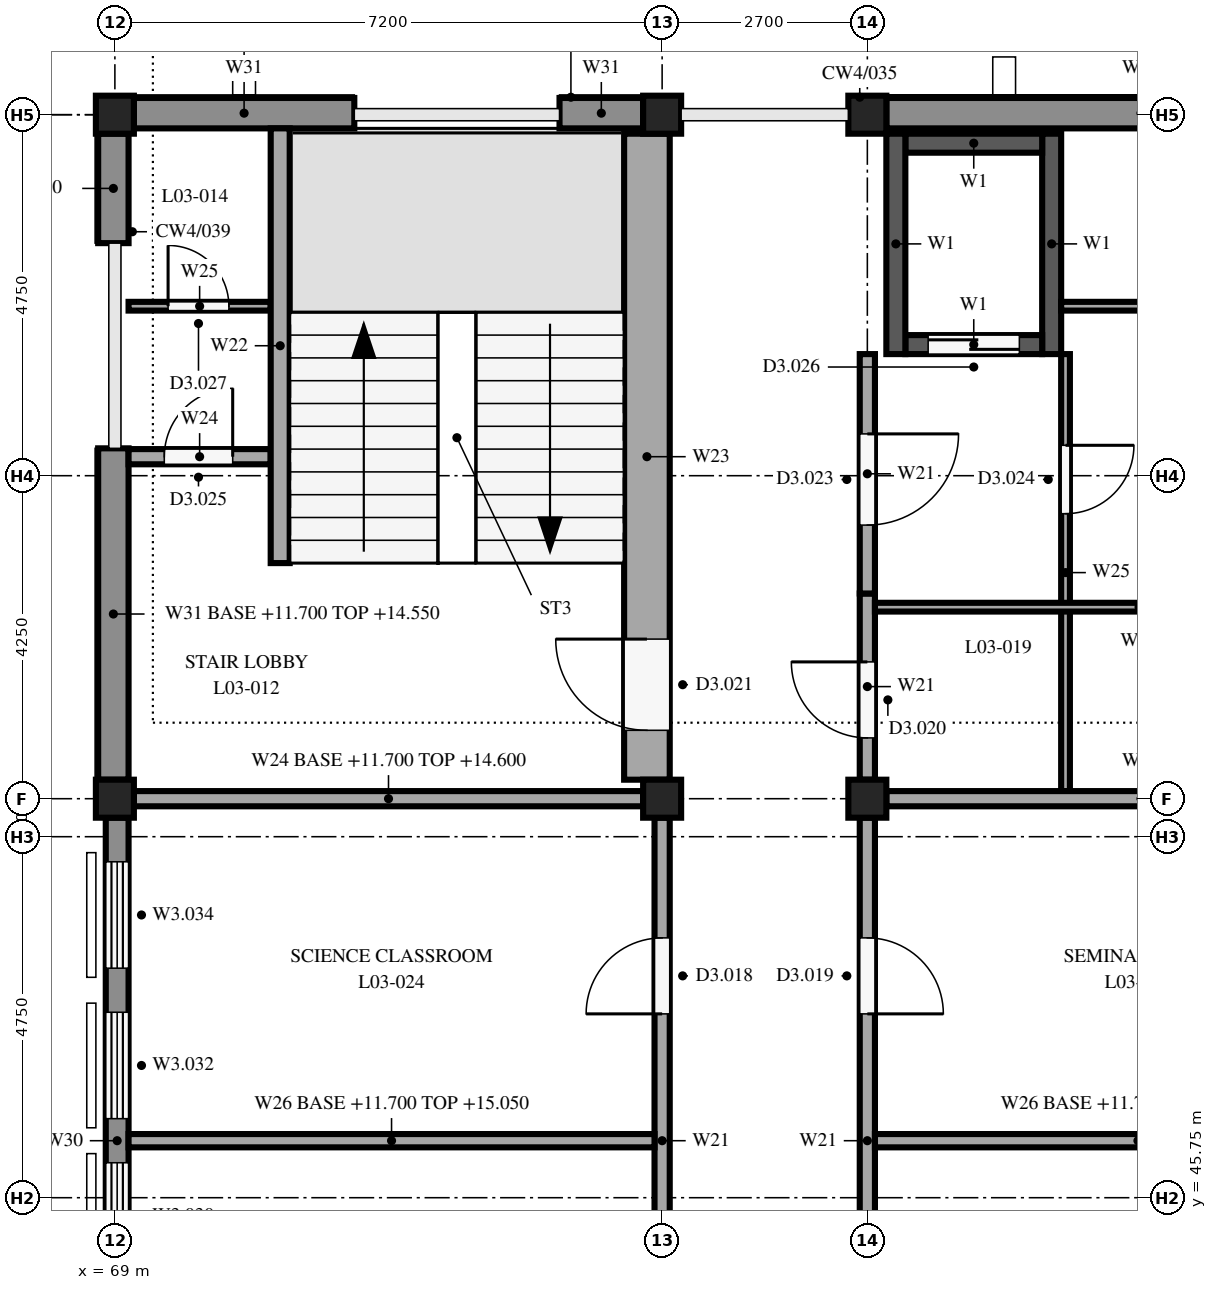
"""IFC4 building model, lengths in metres.
Left out: names, types, materials, properties, quantities, classifications, styles, units other than length and angle.
Written with IfcOpenShell. Run it as: python <this file> out.ifc"""

import sys

from ifc_helpers import new_model, si_unit, direction, frame, frame_2d, origin, origin_2d, place, context, subcontext, project, spatial, rectangle, extrude, element, fill, save


model = new_model("IFC4")
c1 = context("Model", 3, precision=1e-05, world=origin(), true_north=direction((0.0, 1.0)))
c2 = subcontext(c1, "Body", "Model", "MODEL_VIEW")
j1 = project(units=[si_unit("LENGTHUNIT", "METRE"), si_unit("PLANEANGLEUNIT", "RADIAN")], contexts=[c1])
p1 = place(None, origin())
s1 = spatial("IfcSite", under=j1, at=p1, CompositionType="ELEMENT")
p2 = place(p1, origin())
s2 = spatial("IfcBuilding", under=s1, at=p2, CompositionType="ELEMENT")
p3 = place(p2, frame((0.0, 0.0, 11.7)))
s3 = spatial("IfcBuildingStorey", under=s2, at=p3, CompositionType="ELEMENT", Elevation=11.7)
for number, where, z_axis, x_axis in (
    (1, (69.0, 51.0, 0.0), (0.0, 0.0, 1.0), (1.0, 0.0, 0.0)),
    (2, (69.0, 60.0, 0.0), (0.0, 0.0, 1.0), (1.0, 0.0, 0.0)),
    (3, (76.2, 51.0, 0.0), (0.0, 0.0, 1.0), (1.0, 0.0, 0.0)),
    (4, (76.2, 60.0, 0.0), (0.0, 0.0, 1.0), (1.0, 0.0, 0.0)),
    (5, (78.9, 51.0, 0.0), (0.0, 0.0, 1.0), (1.0, 0.0, 0.0)),
    (6, (78.9, 60.0, 0.0), (0.0, 0.0, 1.0), (1.0, 0.0, 0.0)),
):
    element("IfcColumn", number, at=place(p3, frame(where, z_axis=z_axis, x_axis=x_axis)), inside=s3, PredefinedType="COLUMN", context=c2, shape_type="SweptSolid", body=[
        extrude(rectangle(XDim=0.5, YDim=0.5, at=origin_2d()), origin(), (0.0, 0.0, 1.0), 3.35),
    ])
for number, where, z_axis, x_axis in (
    (7, (79.275, 56.85, 0.0), (0.0, 0.0, 1.0), (0.0, 1.0, 0.0)),
    (8, (81.325, 56.85, 0.0), (0.0, 0.0, 1.0), (0.0, 1.0, 0.0)),
):
    element("IfcWall", number, at=place(p3, frame(where, z_axis=z_axis, x_axis=x_axis)), inside=s3, PredefinedType="SHEAR", context=c2, shape_type="SweptSolid", body=[
        extrude(rectangle(XDim=2.9, YDim=0.25, at=frame_2d((1.45, 0.0))), origin(), (0.0, 0.0, 1.0), 3.35),
    ])
p4 = place(p3, frame((79.4, 56.975, 0.0), z_axis=(0.0, 0.0, 1.0), x_axis=(1.0, 0.0, 0.0)))
e9 = element("IfcWall", 9, at=p4, inside=s3, PredefinedType="SHEAR", context=c2, shape_type="SweptSolid", body=[
    extrude(rectangle(XDim=1.8, YDim=0.25, at=frame_2d((0.9, 0.0))), origin(), (0.0, 0.0, 1.0), 3.35),
])
p5 = place(p4, frame((0.3, 0.0, 0.0)))
e10 = element("IfcOpeningElement", 10, at=p5, cuts=e9, PredefinedType="OPENING", context=c2, shape_type="SweptSolid", body=[
    extrude(rectangle(XDim=1.2, YDim=2.1, at=frame_2d((0.6, 1.05))), frame((0.0, 0.135, 0.0), z_axis=(0.0, -1.0, 0.0), x_axis=(1.0, 0.0, 0.0)), (0.0, 0.0, 1.0), 0.27),
])
p6 = place(p3, frame((79.4, 59.625, 0.0), z_axis=(0.0, 0.0, 1.0), x_axis=(1.0, 0.0, 0.0)))
e11 = element("IfcWall", 11, at=p6, inside=s3, PredefinedType="SHEAR", context=c2, shape_type="SweptSolid", body=[
    extrude(rectangle(XDim=1.8, YDim=0.25, at=frame_2d((0.9, 0.0))), origin(), (0.0, 0.0, 1.0), 3.35),
])
p7 = place(p3, frame((69.03, 42.25, 0.0), z_axis=(0.0, 0.0, 1.0), x_axis=(0.0, 1.0, 0.0)))
e12 = element("IfcWall", 12, at=p7, inside=s3, PredefinedType="STANDARD", context=c2, shape_type="SweptSolid", body=[
    extrude(rectangle(XDim=8.5, YDim=0.3, at=frame_2d((4.25, 0.0))), origin(), (0.0, 0.0, 1.0), 2.85),
])
p8 = place(p7, frame((0.58, 0.0, 0.6)))
e13 = element("IfcOpeningElement", 13, at=p8, cuts=e12, PredefinedType="OPENING", context=c2, shape_type="SweptSolid", body=[
    extrude(rectangle(XDim=1.4, YDim=2.2, at=frame_2d((0.7, 1.1))), frame((0.0, 0.16, 0.0), z_axis=(0.0, -1.0, 0.0), x_axis=(1.0, 0.0, 0.0)), (0.0, 0.0, 1.0), 0.32),
])
p9 = place(p7, frame((2.56, 0.0, 0.6)))
e14 = element("IfcOpeningElement", 14, at=p9, cuts=e12, PredefinedType="OPENING", context=c2, shape_type="SweptSolid", body=[
    extrude(rectangle(XDim=1.4, YDim=2.2, at=frame_2d((0.7, 1.1))), frame((0.0, 0.16, 0.0), z_axis=(0.0, -1.0, 0.0), x_axis=(1.0, 0.0, 0.0)), (0.0, 0.0, 1.0), 0.32),
])
p10 = place(p7, frame((4.54, 0.0, 0.6)))
e15 = element("IfcOpeningElement", 15, at=p10, cuts=e12, PredefinedType="OPENING", context=c2, shape_type="SweptSolid", body=[
    extrude(rectangle(XDim=1.4, YDim=2.2, at=frame_2d((0.7, 1.1))), frame((0.0, 0.16, 0.0), z_axis=(0.0, -1.0, 0.0), x_axis=(1.0, 0.0, 0.0)), (0.0, 0.0, 1.0), 0.32),
])
p11 = place(p7, frame((6.52, 0.0, 0.6)))
e16 = element("IfcOpeningElement", 16, at=p11, cuts=e12, PredefinedType="OPENING", context=c2, shape_type="SweptSolid", body=[
    extrude(rectangle(XDim=1.4, YDim=2.2, at=frame_2d((0.7, 1.1))), frame((0.0, 0.16, 0.0), z_axis=(0.0, -1.0, 0.0), x_axis=(1.0, 0.0, 0.0)), (0.0, 0.0, 1.0), 0.32),
])
p12 = place(p3, frame((68.98, 51.25, 0.0), z_axis=(0.0, 0.0, 1.0), x_axis=(0.0, 1.0, 0.0)))
e17 = element("IfcWall", 17, at=p12, inside=s3, PredefinedType="STANDARD", context=c2, shape_type="SweptSolid", body=[
    extrude(rectangle(XDim=4.36, YDim=0.4, at=frame_2d((2.18, 0.0))), origin(), (0.0, 0.0, 1.0), 2.85),
])
p13 = place(p3, frame((68.98, 58.31, 0.0), z_axis=(0.0, 0.0, 1.0), x_axis=(0.0, 1.0, 0.0)))
e18 = element("IfcWall", 18, at=p13, inside=s3, PredefinedType="STANDARD", context=c2, shape_type="SweptSolid", body=[
    extrude(rectangle(XDim=1.44, YDim=0.4, at=frame_2d((0.72, 0.0))), origin(), (0.0, 0.0, 1.0), 2.85),
])
p14 = place(p3, frame((69.25, 60.02, 0.0), z_axis=(0.0, 0.0, 1.0), x_axis=(1.0, 0.0, 0.0)))
e19 = element("IfcWall", 19, at=p14, inside=s3, PredefinedType="STANDARD", context=c2, shape_type="SweptSolid", body=[
    extrude(rectangle(XDim=2.9, YDim=0.4, at=frame_2d((1.45, 0.0))), origin(), (0.0, 0.0, 1.0), 2.9),
])
p15 = place(p3, frame((74.85, 60.02, 0.0), z_axis=(0.0, 0.0, 1.0), x_axis=(1.0, 0.0, 0.0)))
e20 = element("IfcWall", 20, at=p15, inside=s3, PredefinedType="STANDARD", context=c2, shape_type="SweptSolid", body=[
    extrude(rectangle(XDim=1.1, YDim=0.4, at=frame_2d((0.55, 0.0))), origin(), (0.0, 0.0, 1.0), 2.9),
])
p16 = place(p3, frame((79.15, 60.02, 0.0), z_axis=(0.0, 0.0, 1.0), x_axis=(1.0, 0.0, 0.0)))
e21 = element("IfcWall", 21, at=p16, inside=s3, PredefinedType="STANDARD", context=c2, shape_type="SweptSolid", body=[
    extrude(rectangle(XDim=6.7, YDim=0.4, at=frame_2d((3.35, 0.0))), origin(), (0.0, 0.0, 1.0), 2.9),
])
p17 = place(p16, frame((3.4, 0.0, 1.6)))
e22 = element("IfcOpeningElement", 22, at=p17, cuts=e21, PredefinedType="OPENING", context=c2, shape_type="SweptSolid", body=[
    extrude(rectangle(XDim=0.9, YDim=1.0, at=frame_2d((0.45, 0.5))), frame((0.0, 0.21, 0.0), z_axis=(0.0, -1.0, 0.0), x_axis=(1.0, 0.0, 0.0)), (0.0, 0.0, 1.0), 0.42),
])
p18 = place(p3, frame((71.175, 54.1, 0.0), z_axis=(0.0, 0.0, 1.0), x_axis=(0.0, 1.0, 0.0)))
e23 = element("IfcWall", 23, at=p18, inside=s3, PredefinedType="SOLIDWALL", context=c2, shape_type="SweptSolid", body=[
    extrude(rectangle(XDim=5.72, YDim=0.25, at=frame_2d((2.86, 0.0))), origin(), (0.0, 0.0, 1.0), 3.35),
])
p19 = place(p3, frame((76.0, 51.25, 0.0), z_axis=(0.0, 0.0, 1.0), x_axis=(0.0, 1.0, 0.0)))
e24 = element("IfcWall", 24, at=p19, inside=s3, PredefinedType="SOLIDWALL", context=c2, shape_type="SweptSolid", body=[
    extrude(rectangle(XDim=8.5, YDim=0.6, at=frame_2d((4.25, 0.0))), origin(), (0.0, 0.0, 1.0), 3.35),
])
p20 = place(p19, frame((0.65, 0.0, 0.0)))
e25 = element("IfcOpeningElement", 25, at=p20, cuts=e24, PredefinedType="OPENING", context=c2, shape_type="SweptSolid", body=[
    extrude(rectangle(XDim=1.2, YDim=2.1, at=frame_2d((0.6, 1.05))), frame((0.0, 0.31, 0.0), z_axis=(0.0, -1.0, 0.0), x_axis=(1.0, 0.0, 0.0)), (0.0, 0.0, 1.0), 0.62),
])
p21 = place(p3, frame((69.18, 55.5, 0.0), z_axis=(0.0, 0.0, 1.0), x_axis=(1.0, 0.0, 0.0)))
e26 = element("IfcWall", 26, at=p21, inside=s3, PredefinedType="SOLIDWALL", context=c2, shape_type="SweptSolid", body=[
    extrude(rectangle(XDim=1.87, YDim=0.2, at=frame_2d((0.935, 0.0))), origin(), (0.0, 0.0, 1.0), 3.35),
])
p22 = place(p21, frame((0.47, 0.0, 0.0)))
e27 = element("IfcOpeningElement", 27, at=p22, cuts=e26, PredefinedType="OPENING", context=c2, shape_type="SweptSolid", body=[
    extrude(rectangle(XDim=0.9, YDim=2.1, at=frame_2d((0.45, 1.05))), frame((0.0, 0.11, 0.0), z_axis=(0.0, -1.0, 0.0), x_axis=(1.0, 0.0, 0.0)), (0.0, 0.0, 1.0), 0.22),
])
p23 = place(p3, frame((69.18, 57.48, 0.0), z_axis=(0.0, 0.0, 1.0), x_axis=(1.0, 0.0, 0.0)))
e28 = element("IfcWall", 28, at=p23, inside=s3, PredefinedType="PARTITIONING", context=c2, shape_type="SweptSolid", body=[
    extrude(rectangle(XDim=1.87, YDim=0.115, at=frame_2d((0.935, 0.0))), origin(), (0.0, 0.0, 1.0), 3.35),
])
p24 = place(p23, frame((0.52, 0.0, 0.0)))
e29 = element("IfcOpeningElement", 29, at=p24, cuts=e28, PredefinedType="OPENING", context=c2, shape_type="SweptSolid", body=[
    extrude(rectangle(XDim=0.8, YDim=2.1, at=frame_2d((0.4, 1.05))), frame((0.0, 0.067, 0.0), z_axis=(0.0, -1.0, 0.0), x_axis=(1.0, 0.0, 0.0)), (0.0, 0.0, 1.0), 0.135),
])
p25 = place(p3, frame((69.25, 51.0, 0.0), z_axis=(0.0, 0.0, 1.0), x_axis=(1.0, 0.0, 0.0)))
e30 = element("IfcWall", 30, at=p25, inside=s3, PredefinedType="SOLIDWALL", context=c2, shape_type="SweptSolid", body=[
    extrude(rectangle(XDim=6.7, YDim=0.2, at=frame_2d((3.35, 0.0))), origin(), (0.0, 0.0, 1.0), 2.9),
])
p26 = place(p3, frame((78.9, 51.25, 0.0), z_axis=(0.0, 0.0, 1.0), x_axis=(0.0, 1.0, 0.0)))
e31 = element("IfcWall", 31, at=p26, inside=s3, PredefinedType="PARTITIONING", context=c2, shape_type="SweptSolid", body=[
    extrude(rectangle(XDim=2.45, YDim=0.2, at=frame_2d((1.225, 0.0))), origin(), (0.0, 0.0, 1.0), 2.9),
])
p27 = place(p26, frame((0.55, 0.0, 0.0)))
e32 = element("IfcOpeningElement", 32, at=p27, cuts=e31, PredefinedType="OPENING", context=c2, shape_type="SweptSolid", body=[
    extrude(rectangle(XDim=1.0, YDim=2.1, at=frame_2d((0.5, 1.05))), frame((0.0, 0.11, 0.0), z_axis=(0.0, -1.0, 0.0), x_axis=(1.0, 0.0, 0.0)), (0.0, 0.0, 1.0), 0.22),
])
p28 = place(p3, frame((78.9, 56.85, 0.0), z_axis=(0.0, 0.0, 1.0), x_axis=(0.0, -1.0, 0.0)))
e33 = element("IfcWall", 33, at=p28, inside=s3, PredefinedType="PARTITIONING", context=c2, shape_type="SweptSolid", body=[
    extrude(rectangle(XDim=3.15, YDim=0.2, at=frame_2d((1.575, 0.0))), origin(), (0.0, 0.0, 1.0), 2.9),
])
p29 = place(p28, frame((1.05, 0.0, 0.0)))
e34 = element("IfcOpeningElement", 34, at=p29, cuts=e33, PredefinedType="OPENING", context=c2, shape_type="SweptSolid", body=[
    extrude(rectangle(XDim=1.2, YDim=2.1, at=frame_2d((0.6, 1.05))), frame((0.0, 0.11, 0.0), z_axis=(0.0, -1.0, 0.0), x_axis=(1.0, 0.0, 0.0)), (0.0, 0.0, 1.0), 0.22),
])
p30 = place(p3, frame((79.15, 51.0, 0.0), z_axis=(0.0, 0.0, 1.0), x_axis=(1.0, 0.0, 0.0)))
e35 = element("IfcWall", 35, at=p30, inside=s3, PredefinedType="PARTITIONING", context=c2, shape_type="SweptSolid", body=[
    extrude(rectangle(XDim=6.7, YDim=0.2, at=frame_2d((3.35, 0.0))), origin(), (0.0, 0.0, 1.0), 2.9),
])
p31 = place(p3, frame((81.508, 56.85, 0.0), z_axis=(0.0, 0.0, 1.0), x_axis=(0.0, -1.0, 0.0)))
e36 = element("IfcWall", 36, at=p31, inside=s3, PredefinedType="PARTITIONING", context=c2, shape_type="SweptSolid", body=[
    extrude(rectangle(XDim=5.75, YDim=0.115, at=frame_2d((2.875, 0.0))), origin(), (0.0, 0.0, 1.0), 3.35),
])
p32 = place(p31, frame((1.2, 0.0, 0.0)))
e37 = element("IfcOpeningElement", 37, at=p32, cuts=e36, PredefinedType="OPENING", context=c2, shape_type="SweptSolid", body=[
    extrude(rectangle(XDim=0.9, YDim=2.1, at=frame_2d((0.45, 1.05))), frame((0.0, 0.067, 0.0), z_axis=(0.0, -1.0, 0.0), x_axis=(1.0, 0.0, 0.0)), (0.0, 0.0, 1.0), 0.135),
])
p33 = place(p3, frame((81.45, 57.48, 0.0), z_axis=(0.0, 0.0, 1.0), x_axis=(1.0, 0.0, 0.0)))
e38 = element("IfcWall", 38, at=p33, inside=s3, PredefinedType="PARTITIONING", context=c2, shape_type="SweptSolid", body=[
    extrude(rectangle(XDim=4.5, YDim=0.115, at=frame_2d((2.25, 0.0))), origin(), (0.0, 0.0, 1.0), 3.35),
])
p34 = place(p33, frame((1.8, 0.0, 0.0)))
e39 = element("IfcOpeningElement", 39, at=p34, cuts=e38, PredefinedType="OPENING", context=c2, shape_type="SweptSolid", body=[
    extrude(rectangle(XDim=0.9, YDim=2.1, at=frame_2d((0.45, 1.05))), frame((0.0, 0.067, 0.0), z_axis=(0.0, -1.0, 0.0), x_axis=(1.0, 0.0, 0.0)), (0.0, 0.0, 1.0), 0.135),
])
p35 = place(p3, frame((85.95, 53.52, 0.0), z_axis=(0.0, 0.0, 1.0), x_axis=(-1.0, 0.0, 0.0)))
e40 = element("IfcWall", 40, at=p35, inside=s3, PredefinedType="PARTITIONING", context=c2, shape_type="SweptSolid", body=[
    extrude(rectangle(XDim=6.95, YDim=0.115, at=frame_2d((3.475, 0.0))), origin(), (0.0, 0.0, 1.0), 3.35),
])
p36 = place(p35, frame((1.7, 0.0, 0.0)))
e41 = element("IfcOpeningElement", 41, at=p36, cuts=e40, PredefinedType="OPENING", context=c2, shape_type="SweptSolid", body=[
    extrude(rectangle(XDim=0.9, YDim=2.1, at=frame_2d((0.45, 1.05))), frame((0.0, 0.067, 0.0), z_axis=(0.0, -1.0, 0.0), x_axis=(1.0, 0.0, 0.0)), (0.0, 0.0, 1.0), 0.135),
])
p37 = place(p3, frame((76.2, 42.25, 0.0), z_axis=(0.0, 0.0, 1.0), x_axis=(0.0, 1.0, 0.0)))
e42 = element("IfcWall", 42, at=p37, inside=s3, PredefinedType="PARTITIONING", context=c2, shape_type="SweptSolid", body=[
    extrude(rectangle(XDim=8.5, YDim=0.2, at=frame_2d((4.25, 0.0))), origin(), (0.0, 0.0, 1.0), 2.9),
])
p38 = place(p37, frame((1.581, 0.0, 0.0)))
e43 = element("IfcOpeningElement", 43, at=p38, cuts=e42, PredefinedType="OPENING", context=c2, shape_type="SweptSolid", body=[
    extrude(rectangle(XDim=1.0, YDim=2.1, at=frame_2d((0.5, 1.05))), frame((0.0, 0.11, 0.0), z_axis=(0.0, -1.0, 0.0), x_axis=(1.0, 0.0, 0.0)), (0.0, 0.0, 1.0), 0.22),
])
p39 = place(p37, frame((5.919, 0.0, 0.0)))
e44 = element("IfcOpeningElement", 44, at=p39, cuts=e42, PredefinedType="OPENING", context=c2, shape_type="SweptSolid", body=[
    extrude(rectangle(XDim=1.0, YDim=2.1, at=frame_2d((0.5, 1.05))), frame((0.0, 0.11, 0.0), z_axis=(0.0, -1.0, 0.0), x_axis=(1.0, 0.0, 0.0)), (0.0, 0.0, 1.0), 0.22),
])
p40 = place(p3, frame((69.18, 46.5, 0.0), z_axis=(0.0, 0.0, 1.0), x_axis=(1.0, 0.0, 0.0)))
e45 = element("IfcWall", 45, at=p40, inside=s3, PredefinedType="PARTITIONING", context=c2, shape_type="SweptSolid", body=[
    extrude(rectangle(XDim=6.92, YDim=0.175, at=frame_2d((3.46, 0.0))), origin(), (0.0, 0.0, 1.0), 3.35),
])
p41 = place(p3, frame((78.9, 50.75, 0.0), z_axis=(0.0, 0.0, 1.0), x_axis=(0.0, -1.0, 0.0)))
e46 = element("IfcWall", 46, at=p41, inside=s3, PredefinedType="PARTITIONING", context=c2, shape_type="SweptSolid", body=[
    extrude(rectangle(XDim=8.5, YDim=0.2, at=frame_2d((4.25, 0.0))), origin(), (0.0, 0.0, 1.0), 2.9),
])
p42 = place(p41, frame((5.919, 0.0, 0.0)))
e47 = element("IfcOpeningElement", 47, at=p42, cuts=e46, PredefinedType="OPENING", context=c2, shape_type="SweptSolid", body=[
    extrude(rectangle(XDim=1.0, YDim=2.1, at=frame_2d((0.5, 1.05))), frame((0.0, 0.11, 0.0), z_axis=(0.0, -1.0, 0.0), x_axis=(1.0, 0.0, 0.0)), (0.0, 0.0, 1.0), 0.22),
])
p43 = place(p41, frame((1.581, 0.0, 0.0)))
e48 = element("IfcOpeningElement", 48, at=p43, cuts=e46, PredefinedType="OPENING", context=c2, shape_type="SweptSolid", body=[
    extrude(rectangle(XDim=1.0, YDim=2.1, at=frame_2d((0.5, 1.05))), frame((0.0, 0.11, 0.0), z_axis=(0.0, -1.0, 0.0), x_axis=(1.0, 0.0, 0.0)), (0.0, 0.0, 1.0), 0.22),
])
p44 = place(p3, frame((79.0, 46.5, 0.0), z_axis=(0.0, 0.0, 1.0), x_axis=(1.0, 0.0, 0.0)))
e49 = element("IfcWall", 49, at=p44, inside=s3, PredefinedType="PARTITIONING", context=c2, shape_type="SweptSolid", body=[
    extrude(rectangle(XDim=6.92, YDim=0.175, at=frame_2d((3.46, 0.0))), origin(), (0.0, 0.0, 1.0), 3.35),
])
p45 = place(p9, origin())
e50 = element("IfcWindow", 50, at=p45, inside=s3, PartitioningType="DOUBLE_PANEL_VERTICAL", PredefinedType="WINDOW", context=c2, shape_type="SweptSolid", body=[
    extrude(rectangle(XDim=1.4, YDim=2.2, at=frame_2d((0.7, 1.1))), frame((0.0, 0.03, 0.0), z_axis=(0.0, -1.0, 0.0), x_axis=(1.0, 0.0, 0.0)), (0.0, 0.0, 1.0), 0.06),
])
fill(e14, e50)
p46 = place(p10, origin())
e51 = element("IfcWindow", 51, at=p46, inside=s3, PartitioningType="DOUBLE_PANEL_VERTICAL", PredefinedType="WINDOW", context=c2, shape_type="SweptSolid", body=[
    extrude(rectangle(XDim=1.4, YDim=2.2, at=frame_2d((0.7, 1.1))), frame((0.0, 0.03, 0.0), z_axis=(0.0, -1.0, 0.0), x_axis=(1.0, 0.0, 0.0)), (0.0, 0.0, 1.0), 0.06),
])
fill(e15, e51)
p47 = place(p11, origin())
e52 = element("IfcWindow", 52, at=p47, inside=s3, PartitioningType="DOUBLE_PANEL_VERTICAL", PredefinedType="WINDOW", context=c2, shape_type="SweptSolid", body=[
    extrude(rectangle(XDim=1.4, YDim=2.2, at=frame_2d((0.7, 1.1))), frame((0.0, 0.03, 0.0), z_axis=(0.0, -1.0, 0.0), x_axis=(1.0, 0.0, 0.0)), (0.0, 0.0, 1.0), 0.06),
])
fill(e16, e52)
p48 = place(p20, origin())
e53 = element("IfcDoor", 53, at=p48, inside=s3, OperationType="SINGLE_SWING_RIGHT", PredefinedType="DOOR", context=c2, shape_type="SweptSolid", body=[
    extrude(rectangle(XDim=1.2, YDim=2.1, at=frame_2d((0.6, 1.05))), frame((0.0, 0.025, 0.0), z_axis=(0.0, -1.0, 0.0), x_axis=(1.0, 0.0, 0.0)), (0.0, 0.0, 1.0), 0.05),
])
fill(e25, e53)
p49 = place(p22, origin())
e54 = element("IfcDoor", 54, at=p49, inside=s3, OperationType="SINGLE_SWING_RIGHT", PredefinedType="DOOR", context=c2, shape_type="SweptSolid", body=[
    extrude(rectangle(XDim=0.9, YDim=2.1, at=frame_2d((0.45, 1.05))), frame((0.0, 0.025, 0.0), z_axis=(0.0, -1.0, 0.0), x_axis=(1.0, 0.0, 0.0)), (0.0, 0.0, 1.0), 0.05),
])
fill(e27, e54)
p50 = place(p24, origin())
e55 = element("IfcDoor", 55, at=p50, inside=s3, OperationType="SINGLE_SWING_LEFT", PredefinedType="DOOR", context=c2, shape_type="SweptSolid", body=[
    extrude(rectangle(XDim=0.8, YDim=2.1, at=frame_2d((0.4, 1.05))), frame((0.0, 0.025, 0.0), z_axis=(0.0, -1.0, 0.0), x_axis=(1.0, 0.0, 0.0)), (0.0, 0.0, 1.0), 0.05),
])
fill(e29, e55)
p51 = place(p27, origin())
e56 = element("IfcDoor", 56, at=p51, inside=s3, OperationType="SINGLE_SWING_RIGHT", PredefinedType="DOOR", context=c2, shape_type="SweptSolid", body=[
    extrude(rectangle(XDim=1.0, YDim=2.1, at=frame_2d((0.5, 1.05))), frame((0.0, 0.025, 0.0), z_axis=(0.0, -1.0, 0.0), x_axis=(1.0, 0.0, 0.0)), (0.0, 0.0, 1.0), 0.05),
])
fill(e32, e56)
p52 = place(p29, origin())
e57 = element("IfcDoor", 57, at=p52, inside=s3, OperationType="SINGLE_SWING_LEFT", PredefinedType="DOOR", context=c2, shape_type="SweptSolid", body=[
    extrude(rectangle(XDim=1.2, YDim=2.1, at=frame_2d((0.6, 1.05))), frame((0.0, 0.025, 0.0), z_axis=(0.0, -1.0, 0.0), x_axis=(1.0, 0.0, 0.0)), (0.0, 0.0, 1.0), 0.05),
])
fill(e34, e57)
p53 = place(p32, origin())
e58 = element("IfcDoor", 58, at=p53, inside=s3, OperationType="SINGLE_SWING_LEFT", PredefinedType="DOOR", context=c2, shape_type="SweptSolid", body=[
    extrude(rectangle(XDim=0.9, YDim=2.1, at=frame_2d((0.45, 1.05))), frame((0.0, 0.025, 0.0), z_axis=(0.0, -1.0, 0.0), x_axis=(1.0, 0.0, 0.0)), (0.0, 0.0, 1.0), 0.05),
])
fill(e37, e58)
p54 = place(p39, origin())
e59 = element("IfcDoor", 59, at=p54, inside=s3, OperationType="SINGLE_SWING_LEFT", PredefinedType="DOOR", context=c2, shape_type="SweptSolid", body=[
    extrude(rectangle(XDim=1.0, YDim=2.1, at=frame_2d((0.5, 1.05))), frame((0.0, 0.025, 0.0), z_axis=(0.0, -1.0, 0.0), x_axis=(1.0, 0.0, 0.0)), (0.0, 0.0, 1.0), 0.05),
])
fill(e44, e59)
p55 = place(p43, origin())
e60 = element("IfcDoor", 60, at=p55, inside=s3, OperationType="SINGLE_SWING_RIGHT", PredefinedType="DOOR", context=c2, shape_type="SweptSolid", body=[
    extrude(rectangle(XDim=1.0, YDim=2.1, at=frame_2d((0.5, 1.05))), frame((0.0, 0.025, 0.0), z_axis=(0.0, -1.0, 0.0), x_axis=(1.0, 0.0, 0.0)), (0.0, 0.0, 1.0), 0.05),
])
fill(e48, e60)
p56 = place(p5, origin())
e61 = element("IfcDoor", 61, at=p56, inside=s3, OperationType="SLIDING_TO_LEFT", PredefinedType="DOOR", context=c2, shape_type="SweptSolid", body=[
    extrude(rectangle(XDim=1.2, YDim=2.1, at=frame_2d((0.6, 1.05))), frame((0.0, 0.025, 0.0), z_axis=(0.0, -1.0, 0.0), x_axis=(1.0, 0.0, 0.0)), (0.0, 0.0, 1.0), 0.05),
])
fill(e10, e61)
save(model, sys.argv[1])
